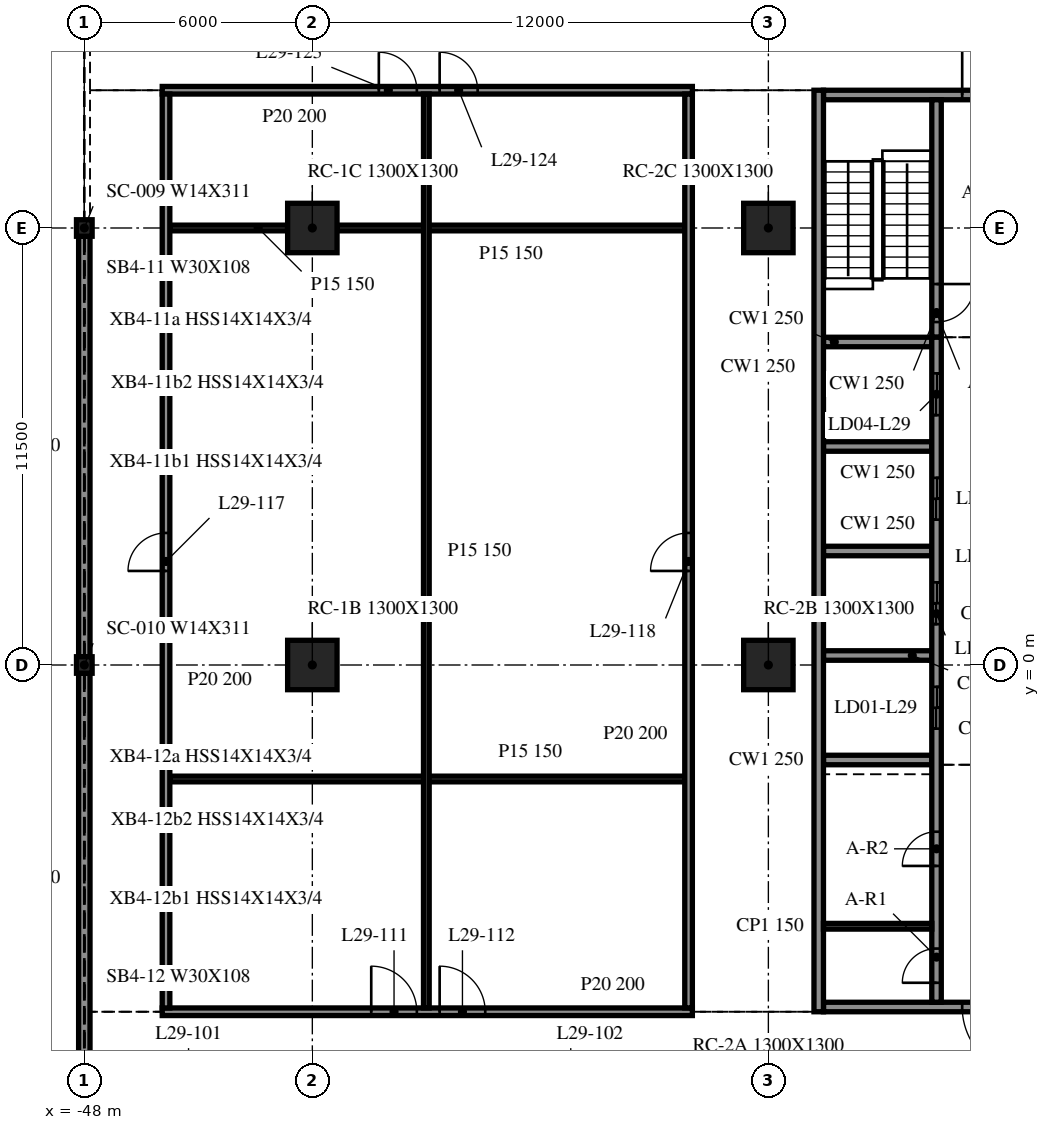
"""IFC4 building model, lengths in metres.
Left out: names, types, materials, properties, quantities, classifications, styles, units other than length and angle.
Written with IfcOpenShell. Run it as: python <this file> out.ifc"""

import sys

from ifc_helpers import new_model, si_unit, direction, frame, frame_2d, origin, origin_2d, place, context, subcontext, project, spatial, rectangle, i_section, extrude, element, fill, save


model = new_model("IFC4")
c1 = context("Model", 3, precision=1e-05, world=origin(), true_north=direction((0.0, 1.0)))
c2 = subcontext(c1, "Body", "Model", "MODEL_VIEW")
j1 = project(units=[si_unit("LENGTHUNIT", "METRE"), si_unit("PLANEANGLEUNIT", "RADIAN")], contexts=[c1])
p1 = place(None, origin())
s1 = spatial("IfcSite", under=j1, at=p1, CompositionType="ELEMENT")
p2 = place(p1, origin())
s2 = spatial("IfcBuilding", under=s1, at=p2, CompositionType="ELEMENT")
p3 = place(p2, frame((0.0, 0.0, 126.1)))
s3 = spatial("IfcBuildingStorey", under=s2, at=p3, CompositionType="ELEMENT", Elevation=126.1)
for number, where, z_axis, x_axis in (
    (1, (-42.0, 0.0, -0.34), (0.0, 0.0, 1.0), (1.0, 0.0, 0.0)),
    (2, (-42.0, 11.5, -0.34), (0.0, 0.0, 1.0), (1.0, 0.0, 0.0)),
    (3, (-30.0, 0.0, -0.34), (0.0, 0.0, 1.0), (1.0, 0.0, 0.0)),
    (4, (-30.0, 11.5, -0.34), (0.0, 0.0, 1.0), (1.0, 0.0, 0.0)),
):
    element("IfcColumn", number, at=place(p3, frame(where, z_axis=z_axis, x_axis=x_axis)), inside=s3, PredefinedType="COLUMN", context=c2, shape_type="SweptSolid", body=[
        extrude(rectangle(XDim=1.3, YDim=1.3, at=origin_2d()), origin(), (0.0, 0.0, 1.0), 4.1),
    ])
for number, where, z_axis, x_axis in (
    (5, (-48.0, 11.5, -0.34), (0.0, 0.0, 1.0), (1.0, 0.0, 0.0)),
    (6, (-48.0, 0.0, -0.34), (0.0, 0.0, 1.0), (1.0, 0.0, 0.0)),
):
    element("IfcColumn", number, at=place(p3, frame(where, z_axis=z_axis, x_axis=x_axis)), inside=s3, PredefinedType="COLUMN", context=c2, shape_type="SweptSolid", body=[
        extrude(i_section(OverallWidth=0.412, OverallDepth=0.434, WebThickness=0.036, FlangeThickness=0.057, at=origin_2d()), origin(), (0.0, 0.0, 1.0), 4.1),
    ])
p4 = place(p3, frame((-48.0, 11.282, 0.0), z_axis=(0.0, 0.0, 1.0), x_axis=(0.0, -1.0, 0.0)))
e7 = element("IfcWall", 7, at=p4, inside=s3, PredefinedType="NOTDEFINED", context=c2, shape_type="SweptSolid", body=[
    extrude(rectangle(XDim=11.064, YDim=0.3, at=frame_2d((5.532, 0.0))), origin(), (0.0, 0.0, 1.0), 3.003),
])
p5 = place(p3, frame((-48.0, -0.218, 0.0), z_axis=(0.0, 0.0, 1.0), x_axis=(0.0, -1.0, 0.0)))
e8 = element("IfcWall", 8, at=p5, inside=s3, PredefinedType="NOTDEFINED", context=c2, shape_type="SweptSolid", body=[
    extrude(rectangle(XDim=10.782, YDim=0.3, at=frame_2d((5.391, 0.0))), origin(), (0.0, 0.0, 1.0), 3.003),
])
p6 = place(p3, frame((-28.675, 15.125, 0.0), z_axis=(0.0, 0.0, 1.0), x_axis=(0.0, -1.0, 0.0)))
e9 = element("IfcWall", 9, at=p6, inside=s3, PredefinedType="SOLIDWALL", context=c2, shape_type="SweptSolid", body=[
    extrude(rectangle(XDim=24.25, YDim=0.25, at=frame_2d((12.125, 0.0))), origin(), (0.0, 0.0, 1.0), 3.76),
])
p7 = place(p3, frame((-19.45, -9.0, 0.0), z_axis=(0.0, 0.0, 1.0), x_axis=(-1.0, 0.0, 0.0)))
e10 = element("IfcWall", 10, at=p7, inside=s3, PredefinedType="SOLIDWALL", context=c2, shape_type="SweptSolid", body=[
    extrude(rectangle(XDim=9.1, YDim=0.25, at=frame_2d((4.55, 0.0))), origin(), (0.0, 0.0, 1.0), 3.76),
])
p8 = place(p7, frame((3.65, 0.0, 0.0)))
e11 = element("IfcOpeningElement", 11, at=p8, cuts=e10, PredefinedType="OPENING", context=c2, shape_type="SweptSolid", body=[
    extrude(rectangle(XDim=1.8, YDim=2.1, at=frame_2d((0.9, 1.05))), frame((0.0, 0.135, 0.0), z_axis=(0.0, -1.0, 0.0), x_axis=(1.0, 0.0, 0.0)), (0.0, 0.0, 1.0), 0.27),
])
p9 = place(p3, frame((-28.55, 15.0, 0.0), z_axis=(0.0, 0.0, 1.0), x_axis=(1.0, 0.0, 0.0)))
e12 = element("IfcWall", 12, at=p9, inside=s3, PredefinedType="SOLIDWALL", context=c2, shape_type="SweptSolid", body=[
    extrude(rectangle(XDim=9.1, YDim=0.25, at=frame_2d((4.55, 0.0))), origin(), (0.0, 0.0, 1.0), 3.76),
])
p10 = place(p9, frame((3.65, 0.0, 0.0)))
e13 = element("IfcOpeningElement", 13, at=p10, cuts=e12, PredefinedType="OPENING", context=c2, shape_type="SweptSolid", body=[
    extrude(rectangle(XDim=1.8, YDim=2.1, at=frame_2d((0.9, 1.05))), frame((0.0, 0.135, 0.0), z_axis=(0.0, -1.0, 0.0), x_axis=(1.0, 0.0, 0.0)), (0.0, 0.0, 1.0), 0.27),
])
p11 = place(p3, frame((-25.575, -8.875, 0.0), z_axis=(0.0, 0.0, 1.0), x_axis=(0.0, 1.0, 0.0)))
e14 = element("IfcWall", 14, at=p11, inside=s3, PredefinedType="SOLIDWALL", context=c2, shape_type="SweptSolid", body=[
    extrude(rectangle(XDim=17.5, YDim=0.25, at=frame_2d((8.75, 0.0))), origin(), (0.0, 0.0, 1.0), 3.76),
])
p12 = place(p11, frame((7.2, 0.0, 0.0)))
e15 = element("IfcOpeningElement", 15, at=p12, cuts=e14, PredefinedType="OPENING", context=c2, shape_type="SweptSolid", body=[
    extrude(rectangle(XDim=1.1, YDim=2.1, at=frame_2d((0.55, 1.05))), frame((0.0, 0.135, 0.0), z_axis=(0.0, -1.0, 0.0), x_axis=(1.0, 0.0, 0.0)), (0.0, 0.0, 1.0), 0.27),
])
p13 = place(p11, frame((9.95, 0.0, 0.0)))
e16 = element("IfcOpeningElement", 16, at=p13, cuts=e14, PredefinedType="OPENING", context=c2, shape_type="SweptSolid", body=[
    extrude(rectangle(XDim=1.1, YDim=2.1, at=frame_2d((0.55, 1.05))), frame((0.0, 0.135, 0.0), z_axis=(0.0, -1.0, 0.0), x_axis=(1.0, 0.0, 0.0)), (0.0, 0.0, 1.0), 0.27),
])
p14 = place(p11, frame((12.7, 0.0, 0.0)))
e17 = element("IfcOpeningElement", 17, at=p14, cuts=e14, PredefinedType="OPENING", context=c2, shape_type="SweptSolid", body=[
    extrude(rectangle(XDim=1.1, YDim=2.1, at=frame_2d((0.55, 1.05))), frame((0.0, 0.135, 0.0), z_axis=(0.0, -1.0, 0.0), x_axis=(1.0, 0.0, 0.0)), (0.0, 0.0, 1.0), 0.27),
])
p15 = place(p11, frame((15.45, 0.0, 0.0)))
e18 = element("IfcOpeningElement", 18, at=p15, cuts=e14, PredefinedType="OPENING", context=c2, shape_type="SweptSolid", body=[
    extrude(rectangle(XDim=1.1, YDim=2.1, at=frame_2d((0.55, 1.05))), frame((0.0, 0.135, 0.0), z_axis=(0.0, -1.0, 0.0), x_axis=(1.0, 0.0, 0.0)), (0.0, 0.0, 1.0), 0.27),
])
p16 = place(p11, frame((0.512, 0.0, 0.0)))
e19 = element("IfcOpeningElement", 19, at=p16, cuts=e14, PredefinedType="OPENING", context=c2, shape_type="SweptSolid", body=[
    extrude(rectangle(XDim=0.9, YDim=2.1, at=frame_2d((0.45, 1.05))), frame((0.0, 0.135, 0.0), z_axis=(0.0, -1.0, 0.0), x_axis=(1.0, 0.0, 0.0)), (0.0, 0.0, 1.0), 0.27),
])
p17 = place(p11, frame((3.587, 0.0, 0.0)))
e20 = element("IfcOpeningElement", 20, at=p17, cuts=e14, PredefinedType="OPENING", context=c2, shape_type="SweptSolid", body=[
    extrude(rectangle(XDim=0.9, YDim=2.1, at=frame_2d((0.45, 1.05))), frame((0.0, 0.135, 0.0), z_axis=(0.0, -1.0, 0.0), x_axis=(1.0, 0.0, 0.0)), (0.0, 0.0, 1.0), 0.27),
])
p18 = place(p3, frame((-25.575, 14.875, 0.0), z_axis=(0.0, 0.0, 1.0), x_axis=(0.0, -1.0, 0.0)))
e21 = element("IfcWall", 21, at=p18, inside=s3, PredefinedType="SOLIDWALL", context=c2, shape_type="SweptSolid", body=[
    extrude(rectangle(XDim=6.25, YDim=0.25, at=frame_2d((3.125, 0.0))), origin(), (0.0, 0.0, 1.0), 3.76),
])
p19 = place(p18, frame((4.85, 0.0, 0.0)))
e22 = element("IfcOpeningElement", 22, at=p19, cuts=e21, PredefinedType="OPENING", context=c2, shape_type="SweptSolid", body=[
    extrude(rectangle(XDim=1.0, YDim=2.1, at=frame_2d((0.5, 1.05))), frame((0.0, 0.135, 0.0), z_axis=(0.0, -1.0, 0.0), x_axis=(1.0, 0.0, 0.0)), (0.0, 0.0, 1.0), 0.27),
])
for number, where, z_axis, x_axis in (
    (23, (-28.55, -2.5, 0.0), (0.0, 0.0, 1.0), (1.0, 0.0, 0.0)),
    (24, (-28.55, 0.25, 0.0), (0.0, 0.0, 1.0), (1.0, 0.0, 0.0)),
    (25, (-28.55, 3.0, 0.0), (0.0, 0.0, 1.0), (1.0, 0.0, 0.0)),
    (26, (-28.55, 5.75, 0.0), (0.0, 0.0, 1.0), (1.0, 0.0, 0.0)),
    (27, (-28.55, 8.5, 0.0), (0.0, 0.0, 1.0), (1.0, 0.0, 0.0)),
):
    element("IfcWall", number, at=place(p3, frame(where, z_axis=z_axis, x_axis=x_axis)), inside=s3, PredefinedType="SOLIDWALL", context=c2, shape_type="SweptSolid", body=[
        extrude(rectangle(XDim=2.85, YDim=0.25, at=frame_2d((1.425, 0.0))), origin(), (0.0, 0.0, 1.0), 3.76),
    ])
p20 = place(p3, frame((-28.55, -6.875, 0.0), z_axis=(0.0, 0.0, 1.0), x_axis=(1.0, 0.0, 0.0)))
e28 = element("IfcWall", 28, at=p20, inside=s3, PredefinedType="PARTITIONING", context=c2, shape_type="SweptSolid", body=[
    extrude(rectangle(XDim=2.85, YDim=0.15, at=frame_2d((1.425, 0.0))), origin(), (0.0, 0.0, 1.0), 3.76),
])
p21 = place(p3, frame((-45.95, -9.125, 0.0), z_axis=(0.0, 0.0, 1.0), x_axis=(1.0, 0.0, 0.0)))
e29 = element("IfcWall", 29, at=p21, inside=s3, PredefinedType="PARTITIONING", context=c2, shape_type="SweptSolid", body=[
    extrude(rectangle(XDim=13.95, YDim=0.2, at=frame_2d((6.975, 0.0))), origin(), (0.0, 0.0, 1.0), 3.76),
])
p22 = place(p21, frame((5.5, 0.0, 0.0)))
e30 = element("IfcOpeningElement", 30, at=p22, cuts=e29, PredefinedType="OPENING", context=c2, shape_type="SweptSolid", body=[
    extrude(rectangle(XDim=1.2, YDim=2.1, at=frame_2d((0.6, 1.05))), frame((0.0, 0.11, 0.0), z_axis=(0.0, -1.0, 0.0), x_axis=(1.0, 0.0, 0.0)), (0.0, 0.0, 1.0), 0.22),
])
p23 = place(p21, frame((7.3, 0.0, 0.0)))
e31 = element("IfcOpeningElement", 31, at=p23, cuts=e29, PredefinedType="OPENING", context=c2, shape_type="SweptSolid", body=[
    extrude(rectangle(XDim=1.2, YDim=2.1, at=frame_2d((0.6, 1.05))), frame((0.0, 0.11, 0.0), z_axis=(0.0, -1.0, 0.0), x_axis=(1.0, 0.0, 0.0)), (0.0, 0.0, 1.0), 0.22),
])
p24 = place(p3, frame((-45.75, -3.0, 0.0), z_axis=(0.0, 0.0, 1.0), x_axis=(1.0, 0.0, 0.0)))
e32 = element("IfcWall", 32, at=p24, inside=s3, PredefinedType="PARTITIONING", context=c2, shape_type="SweptSolid", body=[
    extrude(rectangle(XDim=13.55, YDim=0.15, at=frame_2d((6.775, 0.0))), origin(), (0.0, 0.0, 1.0), 3.76),
])
p25 = place(p3, frame((-45.75, 11.5, 0.0), z_axis=(0.0, 0.0, 1.0), x_axis=(1.0, 0.0, 0.0)))
e33 = element("IfcWall", 33, at=p25, inside=s3, PredefinedType="PARTITIONING", context=c2, shape_type="SweptSolid", body=[
    extrude(rectangle(XDim=3.1, YDim=0.15, at=frame_2d((1.55, 0.0))), origin(), (0.0, 0.0, 1.0), 3.76),
])
p26 = place(p3, frame((-41.35, 11.5, 0.0), z_axis=(0.0, 0.0, 1.0), x_axis=(1.0, 0.0, 0.0)))
e34 = element("IfcWall", 34, at=p26, inside=s3, PredefinedType="PARTITIONING", context=c2, shape_type="SweptSolid", body=[
    extrude(rectangle(XDim=9.15, YDim=0.15, at=frame_2d((4.575, 0.0))), origin(), (0.0, 0.0, 1.0), 3.76),
])
p27 = place(p3, frame((-45.95, 15.125, 0.0), z_axis=(0.0, 0.0, 1.0), x_axis=(1.0, 0.0, 0.0)))
e35 = element("IfcWall", 35, at=p27, inside=s3, PredefinedType="PARTITIONING", context=c2, shape_type="SweptSolid", body=[
    extrude(rectangle(XDim=13.95, YDim=0.2, at=frame_2d((6.975, 0.0))), origin(), (0.0, 0.0, 1.0), 3.76),
])
p28 = place(p27, frame((5.7, 0.0, 0.0)))
e36 = element("IfcOpeningElement", 36, at=p28, cuts=e35, PredefinedType="OPENING", context=c2, shape_type="SweptSolid", body=[
    extrude(rectangle(XDim=1.0, YDim=2.1, at=frame_2d((0.5, 1.05))), frame((0.0, 0.11, 0.0), z_axis=(0.0, -1.0, 0.0), x_axis=(1.0, 0.0, 0.0)), (0.0, 0.0, 1.0), 0.22),
])
p29 = place(p27, frame((7.3, 0.0, 0.0)))
e37 = element("IfcOpeningElement", 37, at=p29, cuts=e35, PredefinedType="OPENING", context=c2, shape_type="SweptSolid", body=[
    extrude(rectangle(XDim=1.0, YDim=2.1, at=frame_2d((0.5, 1.05))), frame((0.0, 0.11, 0.0), z_axis=(0.0, -1.0, 0.0), x_axis=(1.0, 0.0, 0.0)), (0.0, 0.0, 1.0), 0.22),
])
p30 = place(p3, frame((-45.85, -9.025, 0.0), z_axis=(0.0, 0.0, 1.0), x_axis=(0.0, 1.0, 0.0)))
e38 = element("IfcWall", 38, at=p30, inside=s3, PredefinedType="PARTITIONING", context=c2, shape_type="SweptSolid", body=[
    extrude(rectangle(XDim=24.05, YDim=0.2, at=frame_2d((12.025, 0.0))), origin(), (0.0, 0.0, 1.0), 3.76),
])
p31 = place(p30, frame((11.5, 0.0, 0.0)))
e39 = element("IfcOpeningElement", 39, at=p31, cuts=e38, PredefinedType="OPENING", context=c2, shape_type="SweptSolid", body=[
    extrude(rectangle(XDim=1.0, YDim=2.1, at=frame_2d((0.5, 1.05))), frame((0.0, 0.11, 0.0), z_axis=(0.0, -1.0, 0.0), x_axis=(1.0, 0.0, 0.0)), (0.0, 0.0, 1.0), 0.22),
])
p32 = place(p3, frame((-39.0, -9.025, 0.0), z_axis=(0.0, 0.0, 1.0), x_axis=(0.0, 1.0, 0.0)))
e40 = element("IfcWall", 40, at=p32, inside=s3, PredefinedType="PARTITIONING", context=c2, shape_type="SweptSolid", body=[
    extrude(rectangle(XDim=24.05, YDim=0.15, at=frame_2d((12.025, 0.0))), origin(), (0.0, 0.0, 1.0), 3.76),
])
p33 = place(p3, frame((-32.1, -9.025, 0.0), z_axis=(0.0, 0.0, 1.0), x_axis=(0.0, 1.0, 0.0)))
e41 = element("IfcWall", 41, at=p33, inside=s3, PredefinedType="PARTITIONING", context=c2, shape_type="SweptSolid", body=[
    extrude(rectangle(XDim=24.05, YDim=0.2, at=frame_2d((12.025, 0.0))), origin(), (0.0, 0.0, 1.0), 3.76),
])
p34 = place(p33, frame((11.5, 0.0, 0.0)))
e42 = element("IfcOpeningElement", 42, at=p34, cuts=e41, PredefinedType="OPENING", context=c2, shape_type="SweptSolid", body=[
    extrude(rectangle(XDim=1.0, YDim=2.1, at=frame_2d((0.5, 1.05))), frame((0.0, 0.11, 0.0), z_axis=(0.0, -1.0, 0.0), x_axis=(1.0, 0.0, 0.0)), (0.0, 0.0, 1.0), 0.22),
])
p35 = place(p8, origin())
e43 = element("IfcDoor", 43, at=p35, inside=s3, OperationType="DOUBLE_DOOR_SINGLE_SWING", PredefinedType="DOOR", context=c2, shape_type="SweptSolid", body=[
    extrude(rectangle(XDim=1.8, YDim=2.1, at=frame_2d((0.9, 1.05))), frame((0.0, 0.025, 0.0), z_axis=(0.0, -1.0, 0.0), x_axis=(1.0, 0.0, 0.0)), (0.0, 0.0, 1.0), 0.05),
])
fill(e11, e43)
p36 = place(p10, origin())
e44 = element("IfcDoor", 44, at=p36, inside=s3, OperationType="DOUBLE_DOOR_SINGLE_SWING", PredefinedType="DOOR", context=c2, shape_type="SweptSolid", body=[
    extrude(rectangle(XDim=1.8, YDim=2.1, at=frame_2d((0.9, 1.05))), frame((0.0, 0.025, 0.0), z_axis=(0.0, -1.0, 0.0), x_axis=(1.0, 0.0, 0.0)), (0.0, 0.0, 1.0), 0.05),
])
fill(e13, e44)
p37 = place(p12, origin())
e45 = element("IfcDoor", 45, at=p37, inside=s3, OperationType="DOUBLE_DOOR_SLIDING", PredefinedType="DOOR", context=c2, shape_type="SweptSolid", body=[
    extrude(rectangle(XDim=1.1, YDim=2.1, at=frame_2d((0.55, 1.05))), frame((0.0, 0.025, 0.0), z_axis=(0.0, -1.0, 0.0), x_axis=(1.0, 0.0, 0.0)), (0.0, 0.0, 1.0), 0.05),
])
fill(e15, e45)
p38 = place(p13, origin())
e46 = element("IfcDoor", 46, at=p38, inside=s3, OperationType="DOUBLE_DOOR_SLIDING", PredefinedType="DOOR", context=c2, shape_type="SweptSolid", body=[
    extrude(rectangle(XDim=1.1, YDim=2.1, at=frame_2d((0.55, 1.05))), frame((0.0, 0.025, 0.0), z_axis=(0.0, -1.0, 0.0), x_axis=(1.0, 0.0, 0.0)), (0.0, 0.0, 1.0), 0.05),
])
fill(e16, e46)
p39 = place(p14, origin())
e47 = element("IfcDoor", 47, at=p39, inside=s3, OperationType="DOUBLE_DOOR_SLIDING", PredefinedType="DOOR", context=c2, shape_type="SweptSolid", body=[
    extrude(rectangle(XDim=1.1, YDim=2.1, at=frame_2d((0.55, 1.05))), frame((0.0, 0.025, 0.0), z_axis=(0.0, -1.0, 0.0), x_axis=(1.0, 0.0, 0.0)), (0.0, 0.0, 1.0), 0.05),
])
fill(e17, e47)
p40 = place(p15, origin())
e48 = element("IfcDoor", 48, at=p40, inside=s3, OperationType="DOUBLE_DOOR_SLIDING", PredefinedType="DOOR", context=c2, shape_type="SweptSolid", body=[
    extrude(rectangle(XDim=1.1, YDim=2.1, at=frame_2d((0.55, 1.05))), frame((0.0, 0.025, 0.0), z_axis=(0.0, -1.0, 0.0), x_axis=(1.0, 0.0, 0.0)), (0.0, 0.0, 1.0), 0.05),
])
fill(e18, e48)
p41 = place(p16, origin())
e49 = element("IfcDoor", 49, at=p41, inside=s3, OperationType="SINGLE_SWING_LEFT", PredefinedType="DOOR", context=c2, shape_type="SweptSolid", body=[
    extrude(rectangle(XDim=0.9, YDim=2.1, at=frame_2d((0.45, 1.05))), frame((0.0, 0.025, 0.0), z_axis=(0.0, -1.0, 0.0), x_axis=(1.0, 0.0, 0.0)), (0.0, 0.0, 1.0), 0.05),
])
fill(e19, e49)
p42 = place(p17, origin())
e50 = element("IfcDoor", 50, at=p42, inside=s3, OperationType="SINGLE_SWING_RIGHT", PredefinedType="DOOR", context=c2, shape_type="SweptSolid", body=[
    extrude(rectangle(XDim=0.9, YDim=2.1, at=frame_2d((0.45, 1.05))), frame((0.0, 0.025, 0.0), z_axis=(0.0, -1.0, 0.0), x_axis=(1.0, 0.0, 0.0)), (0.0, 0.0, 1.0), 0.05),
])
fill(e20, e50)
p43 = place(p19, origin())
e51 = element("IfcDoor", 51, at=p43, inside=s3, OperationType="SINGLE_SWING_RIGHT", PredefinedType="DOOR", context=c2, shape_type="SweptSolid", body=[
    extrude(rectangle(XDim=1.0, YDim=2.1, at=frame_2d((0.5, 1.05))), frame((0.0, 0.025, 0.0), z_axis=(0.0, -1.0, 0.0), x_axis=(1.0, 0.0, 0.0)), (0.0, 0.0, 1.0), 0.05),
])
fill(e22, e51)
p44 = place(p22, origin())
e52 = element("IfcDoor", 52, at=p44, inside=s3, OperationType="SINGLE_SWING_LEFT", PredefinedType="DOOR", context=c2, shape_type="SweptSolid", body=[
    extrude(rectangle(XDim=1.2, YDim=2.1, at=frame_2d((0.6, 1.05))), frame((0.0, 0.025, 0.0), z_axis=(0.0, -1.0, 0.0), x_axis=(1.0, 0.0, 0.0)), (0.0, 0.0, 1.0), 0.05),
])
fill(e30, e52)
p45 = place(p23, origin())
e53 = element("IfcDoor", 53, at=p45, inside=s3, OperationType="SINGLE_SWING_RIGHT", PredefinedType="DOOR", context=c2, shape_type="SweptSolid", body=[
    extrude(rectangle(XDim=1.2, YDim=2.1, at=frame_2d((0.6, 1.05))), frame((0.0, 0.025, 0.0), z_axis=(0.0, -1.0, 0.0), x_axis=(1.0, 0.0, 0.0)), (0.0, 0.0, 1.0), 0.05),
])
fill(e31, e53)
p46 = place(p31, origin())
e54 = element("IfcDoor", 54, at=p46, inside=s3, OperationType="SINGLE_SWING_RIGHT", PredefinedType="DOOR", context=c2, shape_type="SweptSolid", body=[
    extrude(rectangle(XDim=1.0, YDim=2.1, at=frame_2d((0.5, 1.05))), frame((0.0, 0.025, 0.0), z_axis=(0.0, -1.0, 0.0), x_axis=(1.0, 0.0, 0.0)), (0.0, 0.0, 1.0), 0.05),
])
fill(e39, e54)
p47 = place(p34, origin())
e55 = element("IfcDoor", 55, at=p47, inside=s3, OperationType="SINGLE_SWING_LEFT", PredefinedType="DOOR", context=c2, shape_type="SweptSolid", body=[
    extrude(rectangle(XDim=1.0, YDim=2.1, at=frame_2d((0.5, 1.05))), frame((0.0, 0.025, 0.0), z_axis=(0.0, -1.0, 0.0), x_axis=(1.0, 0.0, 0.0)), (0.0, 0.0, 1.0), 0.05),
])
fill(e42, e55)
p48 = place(p28, origin())
e56 = element("IfcDoor", 56, at=p48, inside=s3, OperationType="SINGLE_SWING_RIGHT", PredefinedType="DOOR", context=c2, shape_type="SweptSolid", body=[
    extrude(rectangle(XDim=1.0, YDim=2.1, at=frame_2d((0.5, 1.05))), frame((0.0, 0.025, 0.0), z_axis=(0.0, -1.0, 0.0), x_axis=(1.0, 0.0, 0.0)), (0.0, 0.0, 1.0), 0.05),
])
fill(e36, e56)
p49 = place(p29, origin())
e57 = element("IfcDoor", 57, at=p49, inside=s3, OperationType="SINGLE_SWING_LEFT", PredefinedType="DOOR", context=c2, shape_type="SweptSolid", body=[
    extrude(rectangle(XDim=1.0, YDim=2.1, at=frame_2d((0.5, 1.05))), frame((0.0, 0.025, 0.0), z_axis=(0.0, -1.0, 0.0), x_axis=(1.0, 0.0, 0.0)), (0.0, 0.0, 1.0), 0.05),
])
fill(e37, e57)
save(model, sys.argv[1])
